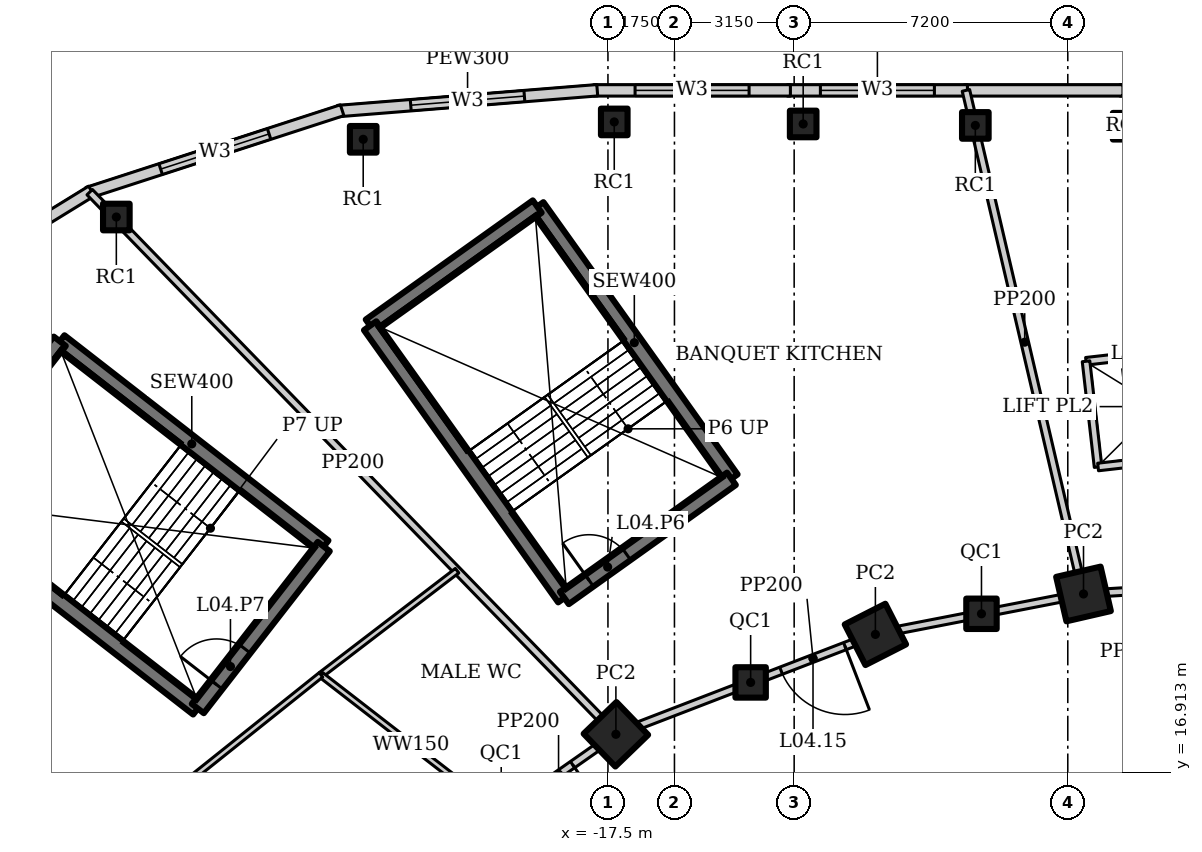
"""IFC4 building model, lengths in metres.
Left out: names, types, materials, properties, quantities, classifications, styles, units other than length and angle.
Written with IfcOpenShell. Run it as: python <this file> out.ifc"""

import sys

from ifc_helpers import new_model, si_unit, direction, frame, frame_2d, origin, origin_2d, place, context, subcontext, project, spatial, rectangle, hollow_rectangle, extrude, element, fill, save


model = new_model("IFC4")
c1 = context("Model", 3, precision=1e-05, world=origin(), true_north=direction((0.0, 1.0)))
c2 = subcontext(c1, "Body", "Model", "MODEL_VIEW")
j1 = project(units=[si_unit("LENGTHUNIT", "METRE"), si_unit("PLANEANGLEUNIT", "RADIAN")], contexts=[c1])
p1 = place(None, origin())
s1 = spatial("IfcSite", under=j1, at=p1, CompositionType="ELEMENT")
p2 = place(p1, origin())
s2 = spatial("IfcBuilding", under=s1, at=p2, CompositionType="ELEMENT")
p3 = place(p2, frame((0.0, 0.0, 27.0)))
s3 = spatial("IfcBuildingStorey", under=s2, at=p3, CompositionType="ELEMENT", Elevation=27.0)
for number, where, z_axis, x_axis in (
    (1, (-4.986, 21.598, 0.0), (0.0, 0.0, 1.0), (0.974, 0.225, 0.0)),
    (2, (-10.463, 20.534, 0.0), (0.0, 0.0, 1.0), (0.891, 0.454, 0.0)),
    (3, (-17.291, 17.905, 0.0), (0.0, 0.0, 1.0), (0.719, 0.695, 0.0)),
):
    element("IfcColumn", number, at=place(p3, frame(where, z_axis=z_axis, x_axis=x_axis)), inside=s3, PredefinedType="COLUMN", context=c2, shape_type="SweptSolid", body=[
        extrude(hollow_rectangle(XDim=1.2, YDim=1.2, WallThickness=0.1, at=origin_2d()), origin(), (0.0, 0.0, 1.0), 5.0),
    ])
for number, where, z_axis, x_axis in (
    (4, (-7.671, 21.076, 0.0), (0.0, 0.0, 1.0), (1.0, 0.0, 0.0)),
    (5, (-13.745, 19.27, 0.0), (0.0, 0.0, 1.0), (1.0, 0.0, 0.0)),
):
    element("IfcColumn", number, at=place(p3, frame(where, z_axis=z_axis, x_axis=x_axis)), inside=s3, PredefinedType="COLUMN", context=c2, shape_type="SweptSolid", body=[
        extrude(hollow_rectangle(XDim=0.8, YDim=0.8, WallThickness=0.05, at=origin_2d()), origin(), (0.0, 0.0, 1.0), 4.8),
    ])
for number, where, z_axis, x_axis in (
    (6, (-3.863, 33.907, 0.0), (0.0, 0.0, 1.0), (1.0, 0.0, 0.0)),
    (7, (-12.363, 33.966, 0.0), (0.0, 0.0, 1.0), (1.0, 0.0, 0.0)),
    (8, (-23.94, 33.563, 0.0), (0.0, 0.0, 1.0), (1.0, 0.0, 0.0)),
    (9, (-7.833, 33.928, 0.0), (0.0, 0.0, 1.0), (1.0, 0.0, 0.0)),
    (10, (-17.334, 34.02, 0.0), (0.0, 0.0, 1.0), (1.0, 0.0, 0.0)),
    (11, (-30.436, 31.518, 0.0), (0.0, 0.0, 1.0), (1.0, 0.0, 0.0)),
):
    element("IfcColumn", number, at=place(p3, frame(where, z_axis=z_axis, x_axis=x_axis)), inside=s3, PredefinedType="COLUMN", context=c2, shape_type="SweptSolid", body=[
        extrude(hollow_rectangle(XDim=0.7, YDim=0.7, WallThickness=0.04, at=origin_2d()), origin(), (0.0, 0.0, 1.0), 4.8),
    ])
p4 = place(p3, frame((0.04, 34.85, 0.0), z_axis=(0.0, 0.0, 1.0), x_axis=(-1.0, 0.0, 0.0)))
e12 = element("IfcWall", 12, at=p4, inside=s3, PredefinedType="SOLIDWALL", context=c2, shape_type="SweptSolid", body=[
    extrude(rectangle(XDim=4.068, YDim=0.3, at=frame_2d((2.034, 0.0))), origin(), (0.0, 0.0, 1.0), 4.8),
])
p5 = place(p3, frame((-3.948, 34.85, 0.0), z_axis=(0.0, 0.0, 1.0), x_axis=(-1.0, 0.0, 0.0)))
e13 = element("IfcWall", 13, at=p5, inside=s3, PredefinedType="SOLIDWALL", context=c2, shape_type="SweptSolid", body=[
    extrude(rectangle(XDim=4.173, YDim=0.3, at=frame_2d((2.086, 0.0))), origin(), (0.0, 0.0, 1.0), 4.8),
])
p6 = place(p3, frame((-8.04, 34.85, 0.0), z_axis=(0.0, 0.0, 1.0), x_axis=(-1.0, 0.0, 0.0)))
e14 = element("IfcWall", 14, at=p6, inside=s3, PredefinedType="SOLIDWALL", context=c2, shape_type="SweptSolid", body=[
    extrude(rectangle(XDim=4.739, YDim=0.3, at=frame_2d((2.369, 0.0))), origin(), (0.0, 0.0, 1.0), 4.8),
])
p7 = place(p6, frame((0.869, 0.0, 0.9)))
e15 = element("IfcOpeningElement", 15, at=p7, cuts=e14, PredefinedType="OPENING", context=c2, shape_type="SweptSolid", body=[
    extrude(rectangle(XDim=3.0, YDim=2.0, at=frame_2d((1.5, 1.0))), frame((0.0, 0.16, 0.0), z_axis=(0.0, -1.0, 0.0), x_axis=(1.0, 0.0, 0.0)), (0.0, 0.0, 1.0), 0.32),
])
p8 = place(p3, frame((-12.699, 34.85, 0.0), z_axis=(0.0, 0.0, 1.0), x_axis=(-1.0, 0.0, 0.0)))
e16 = element("IfcWall", 16, at=p8, inside=s3, PredefinedType="SOLIDWALL", context=c2, shape_type="SweptSolid", body=[
    extrude(rectangle(XDim=5.174, YDim=0.3, at=frame_2d((2.587, 0.0))), origin(), (0.0, 0.0, 1.0), 4.8),
])
p9 = place(p8, frame((1.087, 0.0, 0.9)))
e17 = element("IfcOpeningElement", 17, at=p9, cuts=e16, PredefinedType="OPENING", context=c2, shape_type="SweptSolid", body=[
    extrude(rectangle(XDim=3.0, YDim=2.0, at=frame_2d((1.5, 1.0))), frame((0.0, 0.16, 0.0), z_axis=(0.0, -1.0, 0.0), x_axis=(1.0, 0.0, 0.0)), (0.0, 0.0, 1.0), 0.32),
])
p10 = place(p3, frame((-17.781, 34.854, 0.0), z_axis=(0.0, 0.0, 1.0), x_axis=(-0.996791084449, -0.080047073422, 0.0)))
e18 = element("IfcWall", 18, at=p10, inside=s3, PredefinedType="SOLIDWALL", context=c2, shape_type="SweptSolid", body=[
    extrude(rectangle(XDim=6.847, YDim=0.3, at=frame_2d((3.424, 0.0))), origin(), (0.0, 0.0, 1.0), 4.8),
])
p11 = place(p10, frame((1.924, 0.0, 0.9)))
e19 = element("IfcOpeningElement", 19, at=p11, cuts=e18, PredefinedType="OPENING", context=c2, shape_type="SweptSolid", body=[
    extrude(rectangle(XDim=3.0, YDim=2.0, at=frame_2d((1.5, 1.0))), frame((0.0, 0.16, 0.0), z_axis=(0.0, -1.0, 0.0), x_axis=(1.0, 0.0, 0.0)), (0.0, 0.0, 1.0), 0.32),
])
p12 = place(p3, frame((-24.495, 34.328, 0.0), z_axis=(0.0, 0.0, 1.0), x_axis=(-0.951140010357, -0.308759907853, 0.0)))
e20 = element("IfcWall", 20, at=p12, inside=s3, PredefinedType="SOLIDWALL", context=c2, shape_type="SweptSolid", body=[
    extrude(rectangle(XDim=7.041, YDim=0.3, at=frame_2d((3.521, 0.0))), origin(), (0.0, 0.0, 1.0), 4.8),
])
p13 = place(p12, frame((2.021, 0.0, 0.9)))
e21 = element("IfcOpeningElement", 21, at=p13, cuts=e20, PredefinedType="OPENING", context=c2, shape_type="SweptSolid", body=[
    extrude(rectangle(XDim=3.0, YDim=2.0, at=frame_2d((1.5, 1.0))), frame((0.0, 0.16, 0.0), z_axis=(0.0, -1.0, 0.0), x_axis=(1.0, 0.0, 0.0)), (0.0, 0.0, 1.0), 0.32),
])
p14 = place(p3, frame((-31.088, 32.202, 0.0), z_axis=(0.0, 0.0, 1.0), x_axis=(-0.851808565246, -0.52385319334, 0.0)))
e22 = element("IfcWall", 22, at=p14, inside=s3, PredefinedType="SOLIDWALL", context=c2, shape_type="SweptSolid", body=[
    extrude(rectangle(XDim=6.861, YDim=0.3, at=frame_2d((3.43, 0.0))), origin(), (0.0, 0.0, 1.0), 4.8),
])
p15 = place(p14, frame((1.93, 0.0, 0.9)))
e23 = element("IfcOpeningElement", 23, at=p15, cuts=e22, PredefinedType="OPENING", context=c2, shape_type="SweptSolid", body=[
    extrude(rectangle(XDim=3.0, YDim=2.0, at=frame_2d((1.5, 1.0))), frame((0.0, 0.16, 0.0), z_axis=(0.0, -1.0, 0.0), x_axis=(1.0, 0.0, 0.0)), (0.0, 0.0, 1.0), 0.32),
])
p16 = place(p3, frame((-2.478, 21.75, 0.0), z_axis=(0.0, 0.0, 1.0), x_axis=(-0.998172405641, -0.060430527186, 0.0)))
e24 = element("IfcWall", 24, at=p16, inside=s3, PredefinedType="SOLIDWALL", context=c2, shape_type="SweptSolid", body=[
    extrude(rectangle(XDim=2.513, YDim=0.2, at=frame_2d((1.256, 0.0))), origin(), (0.0, 0.0, 1.0), 4.394),
])
p17 = place(p3, frame((-4.986, 21.598, 0.0), z_axis=(0.0, 0.0, 1.0), x_axis=(-0.981637218105, -0.190757364289, 0.0)))
e25 = element("IfcWall", 25, at=p17, inside=s3, PredefinedType="SOLIDWALL", context=c2, shape_type="SweptSolid", body=[
    extrude(rectangle(XDim=2.735, YDim=0.2, at=frame_2d((1.368, 0.0))), origin(), (0.0, 0.0, 1.0), 4.302),
])
p18 = place(p3, frame((-7.671, 21.076, 0.0), z_axis=(0.0, 0.0, 1.0), x_axis=(-0.98163593748, -0.190763954266, 0.0)))
e26 = element("IfcWall", 26, at=p18, inside=s3, PredefinedType="SOLIDWALL", context=c2, shape_type="SweptSolid", body=[
    extrude(rectangle(XDim=2.844, YDim=0.2, at=frame_2d((1.422, 0.0))), origin(), (0.0, 0.0, 1.0), 4.394),
])
p19 = place(p3, frame((-10.463, 20.534, 0.0), z_axis=(0.0, 0.0, 1.0), x_axis=(-0.933241815012, -0.359248820058, 0.0)))
e27 = element("IfcWall", 27, at=p19, inside=s3, PredefinedType="SOLIDWALL", context=c2, shape_type="SweptSolid", body=[
    extrude(rectangle(XDim=3.518, YDim=0.2, at=frame_2d((1.759, 0.0))), origin(), (0.0, 0.0, 1.0), 4.394),
])
p20 = place(p19, frame((0.859, 0.0, 0.0)))
e28 = element("IfcOpeningElement", 28, at=p20, cuts=e27, PredefinedType="OPENING", context=c2, shape_type="SweptSolid", body=[
    extrude(rectangle(XDim=1.8, YDim=2.4, at=frame_2d((0.9, 1.2))), frame((0.0, 0.11, 0.0), z_axis=(0.0, -1.0, 0.0), x_axis=(1.0, 0.0, 0.0)), (0.0, 0.0, 1.0), 0.22),
])
p21 = place(p3, frame((-13.745, 19.27, 0.0), z_axis=(0.0, 0.0, 1.0), x_axis=(-0.933224646415, -0.359293416754, 0.0)))
e29 = element("IfcWall", 29, at=p21, inside=s3, PredefinedType="SOLIDWALL", context=c2, shape_type="SweptSolid", body=[
    extrude(rectangle(XDim=3.799, YDim=0.2, at=frame_2d((1.899, 0.0))), origin(), (0.0, 0.0, 1.0), 4.394),
])
p22 = place(p3, frame((-17.291, 17.905, 0.0), z_axis=(0.0, 0.0, 1.0), x_axis=(-0.819409395821, -0.573208724672, 0.0)))
e30 = element("IfcWall", 30, at=p22, inside=s3, PredefinedType="SOLIDWALL", context=c2, shape_type="SweptSolid", body=[
    extrude(rectangle(XDim=3.683, YDim=0.2, at=frame_2d((1.841, 0.0))), origin(), (0.0, 0.0, 1.0), 4.338),
])
p23 = place(p22, frame((1.391, 0.0, 0.0)))
e31 = element("IfcOpeningElement", 31, at=p23, cuts=e30, PredefinedType="OPENING", context=c2, shape_type="SweptSolid", body=[
    extrude(rectangle(XDim=0.9, YDim=2.1, at=frame_2d((0.45, 1.05))), frame((0.0, 0.11, 0.0), z_axis=(0.0, -1.0, 0.0), x_axis=(1.0, 0.0, 0.0)), (0.0, 0.0, 1.0), 0.22),
])
p24 = place(p3, frame((-4.986, 21.598, 0.0), z_axis=(0.0, 0.0, 1.0), x_axis=(-0.227360055616, 0.973810764528, 0.0)))
e32 = element("IfcWall", 32, at=p24, inside=s3, PredefinedType="SOLIDWALL", context=c2, shape_type="SweptSolid", body=[
    extrude(rectangle(XDim=13.608, YDim=0.2, at=frame_2d((6.804, 0.0))), origin(), (0.0, 0.0, 1.0), 3.878),
])
p25 = place(p3, frame((-17.291, 17.905, 0.0), z_axis=(0.0, 0.0, 1.0), x_axis=(-0.696460684513, 0.717594951855, 0.0)))
e33 = element("IfcWall", 33, at=p25, inside=s3, PredefinedType="SOLIDWALL", context=c2, shape_type="SweptSolid", body=[
    extrude(rectangle(XDim=19.881, YDim=0.2, at=frame_2d((9.94, 0.0))), origin(), (0.0, 0.0, 1.0), 3.3),
])
p26 = place(p3, frame((-21.469, 22.211, 0.0), z_axis=(0.0, 0.0, 1.0), x_axis=(-0.794122703503, -0.607757461313, 0.0)))
e34 = element("IfcWall", 34, at=p26, inside=s3, PredefinedType="SOLIDWALL", context=c2, shape_type="SweptSolid", body=[
    extrude(rectangle(XDim=4.51, YDim=0.15, at=frame_2d((2.255, 0.0))), origin(), (0.0, 0.0, 1.0), 4.8),
])
p27 = place(p3, frame((-20.309, 15.794, 0.0), z_axis=(0.0, 0.0, 1.0), x_axis=(-0.790437708207, 0.61254243073, 0.0)))
e35 = element("IfcWall", 35, at=p27, inside=s3, PredefinedType="SOLIDWALL", context=c2, shape_type="SweptSolid", body=[
    extrude(rectangle(XDim=6.0, YDim=0.15, at=frame_2d((3.0, 0.0))), origin(), (0.0, 0.0, 1.0), 4.8),
])
p28 = place(p3, frame((-25.051, 19.469, 0.0), z_axis=(0.0, 0.0, 1.0), x_axis=(-0.781204641684, -0.624275025779, 0.0)))
e36 = element("IfcWall", 36, at=p28, inside=s3, PredefinedType="SOLIDWALL", context=c2, shape_type="SweptSolid", body=[
    extrude(rectangle(XDim=4.821, YDim=0.15, at=frame_2d((2.411, 0.0))), origin(), (0.0, 0.0, 1.0), 4.8),
])
p29 = place(p3, frame((-14.251, 24.629, 0.0), z_axis=(0.0, 0.0, 1.0), x_axis=(-0.580705313356, 0.814113836659, 0.0)))
e37 = element("IfcWall", 37, at=p29, inside=s3, PredefinedType="SHEAR", context=c2, shape_type="SweptSolid", body=[
    extrude(rectangle(XDim=8.8, YDim=0.4, at=frame_2d((4.4, 0.0))), origin(), (0.0, 0.0, 1.0), 5.0),
])
p30 = place(p3, frame((-19.361, 31.793, 0.0), z_axis=(0.0, 0.0, 1.0), x_axis=(-0.814121252423, -0.580694916762, 0.0)))
e38 = element("IfcWall", 38, at=p30, inside=s3, PredefinedType="SHEAR", context=c2, shape_type="SweptSolid", body=[
    extrude(rectangle(XDim=5.4, YDim=0.4, at=frame_2d((2.7, 0.0))), origin(), (0.0, 0.0, 1.0), 5.0),
])
p31 = place(p3, frame((-23.757, 28.657, 0.0), z_axis=(0.0, 0.0, 1.0), x_axis=(0.580705313356, -0.814113836659, 0.0)))
e39 = element("IfcWall", 39, at=p31, inside=s3, PredefinedType="SHEAR", context=c2, shape_type="SweptSolid", body=[
    extrude(rectangle(XDim=8.8, YDim=0.4, at=frame_2d((4.4, 0.0))), origin(), (0.0, 0.0, 1.0), 5.0),
])
p32 = place(p3, frame((-18.647, 21.493, 0.0), z_axis=(0.0, 0.0, 1.0), x_axis=(0.814121252423, 0.580694916762, 0.0)))
e40 = element("IfcWall", 40, at=p32, inside=s3, PredefinedType="SHEAR", context=c2, shape_type="SweptSolid", body=[
    extrude(rectangle(XDim=5.4, YDim=0.4, at=frame_2d((2.7, 0.0))), origin(), (0.0, 0.0, 1.0), 5.0),
])
p33 = place(p32, frame((0.8, 0.0, 0.0)))
e41 = element("IfcOpeningElement", 41, at=p33, cuts=e40, PredefinedType="OPENING", context=c2, shape_type="SweptSolid", body=[
    extrude(rectangle(XDim=1.2, YDim=2.1, at=frame_2d((0.6, 1.05))), frame((0.0, 0.21, 0.0), z_axis=(0.0, -1.0, 0.0), x_axis=(1.0, 0.0, 0.0)), (0.0, 0.0, 1.0), 0.42),
])
p34 = place(p3, frame((-24.978, 22.846, 0.0), z_axis=(0.0, 0.0, 1.0), x_axis=(-0.78938060008, 0.613904119726, 0.0)))
e42 = element("IfcWall", 42, at=p34, inside=s3, PredefinedType="SHEAR", context=c2, shape_type="SweptSolid", body=[
    extrude(rectangle(XDim=8.8, YDim=0.4, at=frame_2d((4.4, 0.0))), origin(), (0.0, 0.0, 1.0), 5.0),
])
p35 = place(p3, frame((-31.924, 28.248, 0.0), z_axis=(0.0, 0.0, 1.0), x_axis=(-0.613912443548, -0.789374126544, 0.0)))
e43 = element("IfcWall", 43, at=p35, inside=s3, PredefinedType="SHEAR", context=c2, shape_type="SweptSolid", body=[
    extrude(rectangle(XDim=5.4, YDim=0.4, at=frame_2d((2.7, 0.0))), origin(), (0.0, 0.0, 1.0), 5.0),
])
p36 = place(p3, frame((-35.239, 23.985, 0.0), z_axis=(0.0, 0.0, 1.0), x_axis=(0.78938060008, -0.613904119726, 0.0)))
e44 = element("IfcWall", 44, at=p36, inside=s3, PredefinedType="SHEAR", context=c2, shape_type="SweptSolid", body=[
    extrude(rectangle(XDim=8.8, YDim=0.4, at=frame_2d((4.4, 0.0))), origin(), (0.0, 0.0, 1.0), 5.0),
])
p37 = place(p3, frame((-28.293, 18.583, 0.0), z_axis=(0.0, 0.0, 1.0), x_axis=(0.613912443548, 0.789374126544, 0.0)))
e45 = element("IfcWall", 45, at=p37, inside=s3, PredefinedType="SHEAR", context=c2, shape_type="SweptSolid", body=[
    extrude(rectangle(XDim=5.4, YDim=0.4, at=frame_2d((2.7, 0.0))), origin(), (0.0, 0.0, 1.0), 5.0),
])
p38 = place(p37, frame((0.8, 0.0, 0.0)))
e46 = element("IfcOpeningElement", 46, at=p38, cuts=e45, PredefinedType="OPENING", context=c2, shape_type="SweptSolid", body=[
    extrude(rectangle(XDim=1.2, YDim=2.1, at=frame_2d((0.6, 1.05))), frame((0.0, 0.21, 0.0), z_axis=(0.0, -1.0, 0.0), x_axis=(1.0, 0.0, 0.0)), (0.0, 0.0, 1.0), 0.42),
])
p39 = place(p3, frame((-1.442, 28.117, 0.0), z_axis=(0.0, 0.0, 1.0), x_axis=(-0.993571061716, -0.113210182053, 0.0)))
e47 = element("IfcWall", 47, at=p39, inside=s3, PredefinedType="SOLIDWALL", context=c2, shape_type="SweptSolid", body=[
    extrude(rectangle(XDim=3.5, YDim=0.2, at=frame_2d((1.75, 0.0))), origin(), (0.0, 0.0, 1.0), 4.8),
])
p40 = place(p3, frame((-4.92, 27.721, 0.0), z_axis=(0.0, 0.0, 1.0), x_axis=(0.113177712989, -0.993574760792, 0.0)))
e48 = element("IfcWall", 48, at=p40, inside=s3, PredefinedType="SOLIDWALL", context=c2, shape_type="SweptSolid", body=[
    extrude(rectangle(XDim=2.8, YDim=0.2, at=frame_2d((1.4, 0.0))), origin(), (0.0, 0.0, 1.0), 4.8),
])
p41 = place(p3, frame((-4.603, 24.939, 0.0), z_axis=(0.0, 0.0, 1.0), x_axis=(0.993571061716, 0.113210182053, 0.0)))
e49 = element("IfcWall", 49, at=p41, inside=s3, PredefinedType="SOLIDWALL", context=c2, shape_type="SweptSolid", body=[
    extrude(rectangle(XDim=3.5, YDim=0.2, at=frame_2d((1.75, 0.0))), origin(), (0.0, 0.0, 1.0), 4.8),
])
p42 = place(p41, frame((1.2, 0.0, 0.0)))
e50 = element("IfcOpeningElement", 50, at=p42, cuts=e49, PredefinedType="OPENING", context=c2, shape_type="SweptSolid", body=[
    extrude(rectangle(XDim=1.1, YDim=2.2, at=frame_2d((0.55, 1.1))), frame((0.0, 0.11, 0.0), z_axis=(0.0, -1.0, 0.0), x_axis=(1.0, 0.0, 0.0)), (0.0, 0.0, 1.0), 0.22),
])
p43 = place(p7, origin())
e51 = element("IfcWindow", 51, at=p43, inside=s3, PartitioningType="SINGLE_PANEL", PredefinedType="WINDOW", context=c2, shape_type="SweptSolid", body=[
    extrude(rectangle(XDim=3.0, YDim=2.0, at=frame_2d((1.5, 1.0))), frame((0.0, 0.03, 0.0), z_axis=(0.0, -1.0, 0.0), x_axis=(1.0, 0.0, 0.0)), (0.0, 0.0, 1.0), 0.06),
])
fill(e15, e51)
p44 = place(p9, origin())
e52 = element("IfcWindow", 52, at=p44, inside=s3, PartitioningType="SINGLE_PANEL", PredefinedType="WINDOW", context=c2, shape_type="SweptSolid", body=[
    extrude(rectangle(XDim=3.0, YDim=2.0, at=frame_2d((1.5, 1.0))), frame((0.0, 0.03, 0.0), z_axis=(0.0, -1.0, 0.0), x_axis=(1.0, 0.0, 0.0)), (0.0, 0.0, 1.0), 0.06),
])
fill(e17, e52)
p45 = place(p11, origin())
e53 = element("IfcWindow", 53, at=p45, inside=s3, PartitioningType="SINGLE_PANEL", PredefinedType="WINDOW", context=c2, shape_type="SweptSolid", body=[
    extrude(rectangle(XDim=3.0, YDim=2.0, at=frame_2d((1.5, 1.0))), frame((0.0, 0.03, 0.0), z_axis=(0.0, -1.0, 0.0), x_axis=(1.0, 0.0, 0.0)), (0.0, 0.0, 1.0), 0.06),
])
fill(e19, e53)
p46 = place(p13, origin())
e54 = element("IfcWindow", 54, at=p46, inside=s3, PartitioningType="SINGLE_PANEL", PredefinedType="WINDOW", context=c2, shape_type="SweptSolid", body=[
    extrude(rectangle(XDim=3.0, YDim=2.0, at=frame_2d((1.5, 1.0))), frame((0.0, 0.03, 0.0), z_axis=(0.0, -1.0, 0.0), x_axis=(1.0, 0.0, 0.0)), (0.0, 0.0, 1.0), 0.06),
])
fill(e21, e54)
p47 = place(p20, origin())
e55 = element("IfcDoor", 55, at=p47, inside=s3, OperationType="DOUBLE_DOOR_DOUBLE_SWING", PredefinedType="DOOR", context=c2, shape_type="SweptSolid", body=[
    extrude(rectangle(XDim=1.8, YDim=2.4, at=frame_2d((0.9, 1.2))), frame((0.0, 0.025, 0.0), z_axis=(0.0, -1.0, 0.0), x_axis=(1.0, 0.0, 0.0)), (0.0, 0.0, 1.0), 0.05),
])
fill(e28, e55)
p48 = place(p23, origin())
e56 = element("IfcDoor", 56, at=p48, inside=s3, OperationType="SINGLE_SWING_LEFT", PredefinedType="DOOR", context=c2, shape_type="SweptSolid", body=[
    extrude(rectangle(XDim=0.9, YDim=2.1, at=frame_2d((0.45, 1.05))), frame((0.0, 0.025, 0.0), z_axis=(0.0, -1.0, 0.0), x_axis=(1.0, 0.0, 0.0)), (0.0, 0.0, 1.0), 0.05),
])
fill(e31, e56)
p49 = place(p33, origin())
e57 = element("IfcDoor", 57, at=p49, inside=s3, OperationType="SINGLE_SWING_RIGHT", PredefinedType="DOOR", context=c2, shape_type="SweptSolid", body=[
    extrude(rectangle(XDim=1.2, YDim=2.1, at=frame_2d((0.6, 1.05))), frame((0.0, 0.025, 0.0), z_axis=(0.0, -1.0, 0.0), x_axis=(1.0, 0.0, 0.0)), (0.0, 0.0, 1.0), 0.05),
])
fill(e41, e57)
p50 = place(p38, origin())
e58 = element("IfcDoor", 58, at=p50, inside=s3, OperationType="SINGLE_SWING_RIGHT", PredefinedType="DOOR", context=c2, shape_type="SweptSolid", body=[
    extrude(rectangle(XDim=1.2, YDim=2.1, at=frame_2d((0.6, 1.05))), frame((0.0, 0.025, 0.0), z_axis=(0.0, -1.0, 0.0), x_axis=(1.0, 0.0, 0.0)), (0.0, 0.0, 1.0), 0.05),
])
fill(e46, e58)
save(model, sys.argv[1])
